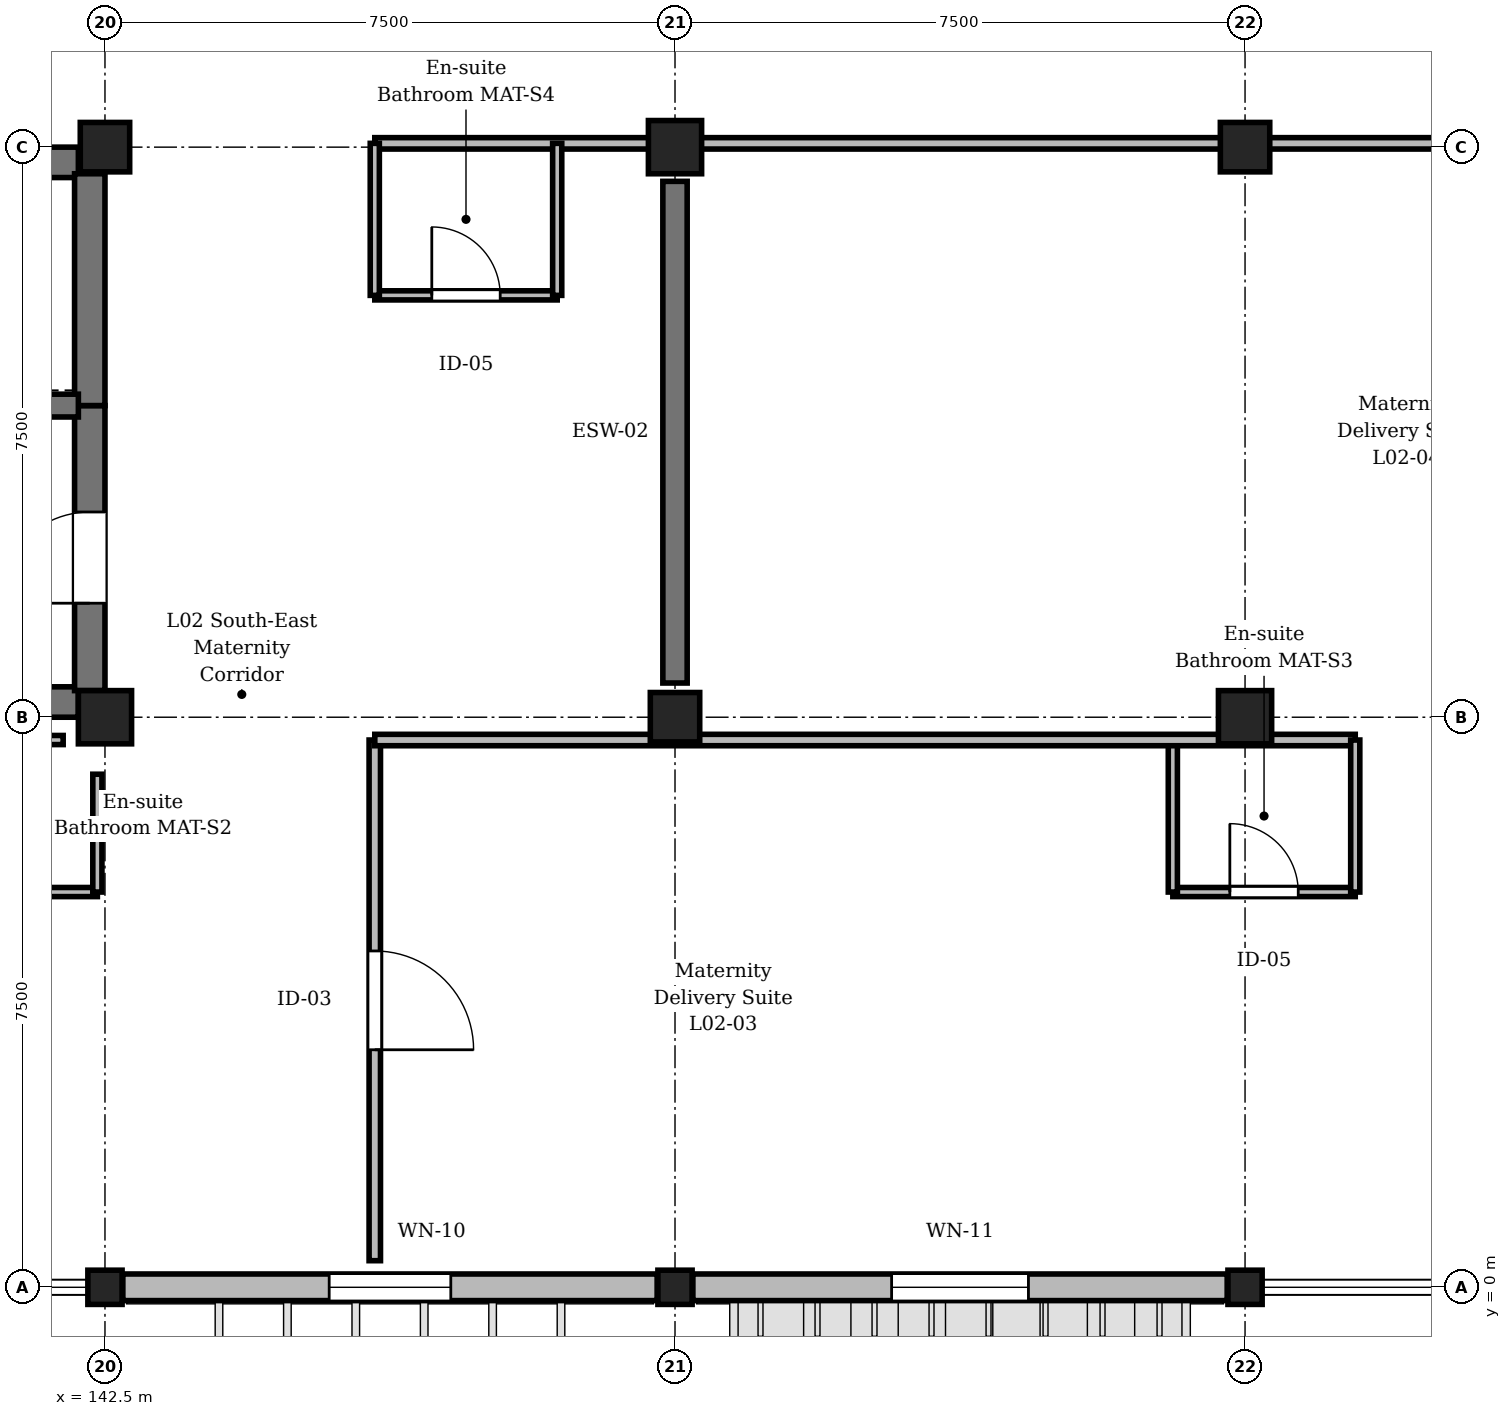
"""IFC4 building model, lengths in metres.
Left out: names, types, materials, properties, quantities, classifications, styles, units other than length and angle.
Written with IfcOpenShell. Run it as: python <this file> out.ifc"""

import sys

from ifc_helpers import new_model, si_unit, direction, frame, frame_2d, origin, origin_2d, place, context, subcontext, project, spatial, rectangle, extrude, element, fill, save


model = new_model("IFC4")
c1 = context("Model", 3, precision=1e-05, world=origin(), true_north=direction((0.0, 1.0)))
c2 = subcontext(c1, "Body", "Model", "MODEL_VIEW")
j1 = project(units=[si_unit("LENGTHUNIT", "METRE"), si_unit("PLANEANGLEUNIT", "RADIAN")], contexts=[c1])
p1 = place(None, origin())
s1 = spatial("IfcSite", under=j1, at=p1, CompositionType="ELEMENT")
p2 = place(p1, origin())
s2 = spatial("IfcBuilding", under=s1, at=p2, CompositionType="ELEMENT")
p3 = place(p2, frame((0.0, 0.0, 9.3)))
s3 = spatial("IfcBuildingStorey", under=s2, at=p3, CompositionType="ELEMENT", Elevation=9.3)
p4 = place(p3, frame((142.5, 0.0, 0.0), z_axis=(0.0, 0.0, 1.0), x_axis=(1.0, 0.0, 0.0)))
e1 = element("IfcColumn", 1, at=p4, inside=s3, PredefinedType="COLUMN", context=c2, shape_type="SweptSolid", body=[
    extrude(rectangle(XDim=0.45, YDim=0.45, at=origin_2d()), origin(), (0.0, 0.0, 1.0), 4.8),
])
p5 = place(p3, frame((142.5, 7.5, 0.0), z_axis=(0.0, 0.0, 1.0), x_axis=(1.0, 0.0, 0.0)))
e2 = element("IfcColumn", 2, at=p5, inside=s3, PredefinedType="COLUMN", context=c2, shape_type="SweptSolid", body=[
    extrude(rectangle(XDim=0.7, YDim=0.7, at=origin_2d()), origin(), (0.0, 0.0, 1.0), 4.8),
])
p6 = place(p3, frame((142.5, 15.0, 0.0), z_axis=(0.0, 0.0, 1.0), x_axis=(1.0, 0.0, 0.0)))
e3 = element("IfcColumn", 3, at=p6, inside=s3, PredefinedType="COLUMN", context=c2, shape_type="SweptSolid", body=[
    extrude(rectangle(XDim=0.65, YDim=0.65, at=origin_2d()), origin(), (0.0, 0.0, 1.0), 4.8),
])
p7 = place(p3, frame((150.0, 0.0, 0.0), z_axis=(0.0, 0.0, 1.0), x_axis=(1.0, 0.0, 0.0)))
e4 = element("IfcColumn", 4, at=p7, inside=s3, PredefinedType="COLUMN", context=c2, shape_type="SweptSolid", body=[
    extrude(rectangle(XDim=0.45, YDim=0.45, at=origin_2d()), origin(), (0.0, 0.0, 1.0), 4.8),
])
p8 = place(p3, frame((150.0, 7.5, 0.0), z_axis=(0.0, 0.0, 1.0), x_axis=(1.0, 0.0, 0.0)))
e5 = element("IfcColumn", 5, at=p8, inside=s3, PredefinedType="COLUMN", context=c2, shape_type="SweptSolid", body=[
    extrude(rectangle(XDim=0.65, YDim=0.65, at=origin_2d()), origin(), (0.0, 0.0, 1.0), 4.8),
])
p9 = place(p3, frame((150.0, 15.0, 0.0), z_axis=(0.0, 0.0, 1.0), x_axis=(1.0, 0.0, 0.0)))
e6 = element("IfcColumn", 6, at=p9, inside=s3, PredefinedType="COLUMN", context=c2, shape_type="SweptSolid", body=[
    extrude(rectangle(XDim=0.7, YDim=0.7, at=origin_2d()), origin(), (0.0, 0.0, 1.0), 4.8),
])
p10 = place(p3, frame((157.5, 0.0, 0.0), z_axis=(0.0, 0.0, 1.0), x_axis=(1.0, 0.0, 0.0)))
e7 = element("IfcColumn", 7, at=p10, inside=s3, PredefinedType="COLUMN", context=c2, shape_type="SweptSolid", body=[
    extrude(rectangle(XDim=0.45, YDim=0.45, at=origin_2d()), origin(), (0.0, 0.0, 1.0), 4.8),
])
p11 = place(p3, frame((157.5, 7.5, 0.0), z_axis=(0.0, 0.0, 1.0), x_axis=(1.0, 0.0, 0.0)))
e8 = element("IfcColumn", 8, at=p11, inside=s3, PredefinedType="COLUMN", context=c2, shape_type="SweptSolid", body=[
    extrude(rectangle(XDim=0.7, YDim=0.7, at=origin_2d()), origin(), (0.0, 0.0, 1.0), 4.8),
])
p12 = place(p3, frame((157.5, 15.0, 0.0), z_axis=(0.0, 0.0, 1.0), x_axis=(1.0, 0.0, 0.0)))
e9 = element("IfcColumn", 9, at=p12, inside=s3, PredefinedType="COLUMN", context=c2, shape_type="SweptSolid", body=[
    extrude(rectangle(XDim=0.65, YDim=0.65, at=origin_2d()), origin(), (0.0, 0.0, 1.0), 4.8),
])
p13 = place(p3, frame((150.0, 7.95, 0.0), z_axis=(0.0, 0.0, 1.0), x_axis=(0.0, 1.0, 0.0)))
e10 = element("IfcWall", 10, at=p13, inside=s3, PredefinedType="SHEAR", context=c2, shape_type="SweptSolid", body=[
    extrude(rectangle(XDim=6.6, YDim=0.32, at=frame_2d((3.3, 0.0))), origin(), (0.0, 0.0, 1.0), 4.0),
])
p14 = place(p3, frame((149.765, 0.0, 0.0), z_axis=(0.0, 0.0, 1.0), x_axis=(-1.0, 0.0, 0.0)))
e11 = element("IfcWall", 11, at=p14, inside=s3, PredefinedType="STANDARD", context=c2, shape_type="SweptSolid", body=[
    extrude(rectangle(XDim=7.03, YDim=0.35, at=frame_2d((3.515, 0.0))), origin(), (0.0, 0.0, 1.0), 3.95),
])
p15 = place(p14, frame((2.715, 0.0, 0.9)))
e12 = element("IfcOpeningElement", 12, at=p15, cuts=e11, PredefinedType="OPENING", context=c2, shape_type="SweptSolid", body=[
    extrude(rectangle(XDim=1.6, YDim=1.95, at=frame_2d((0.8, 0.975))), frame((0.0, 0.185, 0.0), z_axis=(0.0, -1.0, 0.0), x_axis=(1.0, 0.0, 0.0)), (0.0, 0.0, 1.0), 0.37),
])
p16 = place(p3, frame((157.265, 0.0, 0.0), z_axis=(0.0, 0.0, 1.0), x_axis=(-1.0, 0.0, 0.0)))
e13 = element("IfcWall", 13, at=p16, inside=s3, PredefinedType="STANDARD", context=c2, shape_type="SweptSolid", body=[
    extrude(rectangle(XDim=7.03, YDim=0.35, at=frame_2d((3.515, 0.0))), origin(), (0.0, 0.0, 1.0), 3.95),
])
p17 = place(p16, frame((2.615, 0.0, 0.9)))
e14 = element("IfcOpeningElement", 14, at=p17, cuts=e13, PredefinedType="OPENING", context=c2, shape_type="SweptSolid", body=[
    extrude(rectangle(XDim=1.8, YDim=1.95, at=frame_2d((0.9, 0.975))), frame((0.0, 0.185, 0.0), z_axis=(0.0, -1.0, 0.0), x_axis=(1.0, 0.0, 0.0)), (0.0, 0.0, 1.0), 0.37),
])
p18 = place(p3, frame((135.9, 7.7, 0.0), z_axis=(0.0, 0.0, 1.0), x_axis=(1.0, 0.0, 0.0)))
e15 = element("IfcWall", 15, at=p18, inside=s3, PredefinedType="SHEAR", context=c2, shape_type="SweptSolid", body=[
    extrude(rectangle(XDim=6.25, YDim=0.4, at=frame_2d((3.125, 0.0))), origin(), (0.0, 0.0, 1.0), 4.55),
])
p19 = place(p3, frame((127.85, 14.8, 0.0), z_axis=(0.0, 0.0, 1.0), x_axis=(1.0, 0.0, 0.0)))
e16 = element("IfcWall", 16, at=p19, inside=s3, PredefinedType="SHEAR", context=c2, shape_type="SweptSolid", body=[
    extrude(rectangle(XDim=14.3, YDim=0.4, at=frame_2d((7.15, 0.0))), origin(), (0.0, 0.0, 1.0), 4.55),
])
p20 = place(p3, frame((142.3, 7.85, 0.0), z_axis=(0.0, 0.0, 1.0), x_axis=(0.0, 1.0, 0.0)))
e17 = element("IfcWall", 17, at=p20, inside=s3, PredefinedType="SHEAR", context=c2, shape_type="SweptSolid", body=[
    extrude(rectangle(XDim=3.75, YDim=0.4, at=frame_2d((1.875, 0.0))), origin(), (0.0, 0.0, 1.0), 4.55),
])
p21 = place(p20, frame((1.15, 0.0, 0.0)))
e18 = element("IfcOpeningElement", 18, at=p21, cuts=e17, PredefinedType="OPENING", context=c2, shape_type="SweptSolid", body=[
    extrude(rectangle(XDim=1.2, YDim=2.25, at=frame_2d((0.6, 1.125))), frame((0.0, 0.21, 0.0), z_axis=(0.0, -1.0, 0.0), x_axis=(1.0, 0.0, 0.0)), (0.0, 0.0, 1.0), 0.42),
])
p22 = place(p3, frame((142.3, 11.6, 0.0), z_axis=(0.0, 0.0, 1.0), x_axis=(0.0, 1.0, 0.0)))
e19 = element("IfcWall", 19, at=p22, inside=s3, PredefinedType="SHEAR", context=c2, shape_type="SweptSolid", body=[
    extrude(rectangle(XDim=3.05, YDim=0.4, at=frame_2d((1.525, 0.0))), origin(), (0.0, 0.0, 1.0), 4.55),
])
p23 = place(p3, frame((135.9, 11.6, 0.0), z_axis=(0.0, 0.0, 1.0), x_axis=(1.0, 0.0, 0.0)))
e20 = element("IfcWall", 20, at=p23, inside=s3, PredefinedType="SHEAR", context=c2, shape_type="SweptSolid", body=[
    extrude(rectangle(XDim=6.25, YDim=0.3, at=frame_2d((3.125, 0.0))), origin(), (0.0, 0.0, 1.0), 4.55),
])
p24 = place(p23, frame((0.95, 0.0, 0.0)))
e21 = element("IfcOpeningElement", 21, at=p24, cuts=e20, PredefinedType="OPENING", context=c2, shape_type="SweptSolid", body=[
    extrude(rectangle(XDim=1.3, YDim=2.2, at=frame_2d((0.65, 1.1))), frame((0.0, 0.16, 0.0), z_axis=(0.0, -1.0, 0.0), x_axis=(1.0, 0.0, 0.0)), (0.0, 0.0, 1.0), 0.32),
])
p25 = place(p23, frame((4.15, 0.0, 0.0)))
e22 = element("IfcOpeningElement", 22, at=p25, cuts=e20, PredefinedType="OPENING", context=c2, shape_type="SweptSolid", body=[
    extrude(rectangle(XDim=1.3, YDim=2.2, at=frame_2d((0.65, 1.1))), frame((0.0, 0.16, 0.0), z_axis=(0.0, -1.0, 0.0), x_axis=(1.0, 0.0, 0.0)), (0.0, 0.0, 1.0), 0.32),
])
p26 = place(p3, frame((140.0, 5.2, 0.0), z_axis=(0.0, 0.0, 1.0), x_axis=(1.0, 0.0, 0.0)))
e23 = element("IfcWall", 23, at=p26, inside=s3, PredefinedType="PARTITIONING", context=c2, shape_type="SweptSolid", body=[
    extrude(rectangle(XDim=2.4, YDim=0.12, at=frame_2d((1.2, 0.0))), origin(), (0.0, 0.0, 1.0), 4.535),
])
p27 = place(p26, frame((0.75, 0.0, 0.0)))
e24 = element("IfcOpeningElement", 24, at=p27, cuts=e23, PredefinedType="OPENING", context=c2, shape_type="SweptSolid", body=[
    extrude(rectangle(XDim=0.9, YDim=2.1, at=frame_2d((0.45, 1.05))), frame((0.0, 0.07, 0.0), z_axis=(0.0, -1.0, 0.0), x_axis=(1.0, 0.0, 0.0)), (0.0, 0.0, 1.0), 0.14),
])
p28 = place(p3, frame((146.05, 7.2, 0.0), z_axis=(0.0, 0.0, 1.0), x_axis=(0.0, -1.0, 0.0)))
e25 = element("IfcWall", 25, at=p28, inside=s3, PredefinedType="PARTITIONING", context=c2, shape_type="SweptSolid", body=[
    extrude(rectangle(XDim=6.85, YDim=0.15, at=frame_2d((3.425, 0.0))), origin(), (0.0, 0.0, 1.0), 4.535),
])
p29 = place(p28, frame((2.775, 0.0, 0.0)))
e26 = element("IfcOpeningElement", 26, at=p29, cuts=e25, PredefinedType="OPENING", context=c2, shape_type="SweptSolid", body=[
    extrude(rectangle(XDim=1.3, YDim=2.2, at=frame_2d((0.65, 1.1))), frame((0.0, 0.085, 0.0), z_axis=(0.0, -1.0, 0.0), x_axis=(1.0, 0.0, 0.0)), (0.0, 0.0, 1.0), 0.17),
])
p30 = place(p3, frame((156.55, 5.2, 0.0), z_axis=(0.0, 0.0, 1.0), x_axis=(1.0, 0.0, 0.0)))
e27 = element("IfcWall", 27, at=p30, inside=s3, PredefinedType="PARTITIONING", context=c2, shape_type="SweptSolid", body=[
    extrude(rectangle(XDim=2.4, YDim=0.12, at=frame_2d((1.2, 0.0))), origin(), (0.0, 0.0, 1.0), 4.535),
])
p31 = place(p30, frame((0.75, 0.0, 0.0)))
e28 = element("IfcOpeningElement", 28, at=p31, cuts=e27, PredefinedType="OPENING", context=c2, shape_type="SweptSolid", body=[
    extrude(rectangle(XDim=0.9, YDim=2.1, at=frame_2d((0.45, 1.05))), frame((0.0, 0.07, 0.0), z_axis=(0.0, -1.0, 0.0), x_axis=(1.0, 0.0, 0.0)), (0.0, 0.0, 1.0), 0.14),
])
p32 = place(p3, frame((156.55, 5.2, 0.0), z_axis=(0.0, 0.0, 1.0), x_axis=(0.0, 1.0, 0.0)))
e29 = element("IfcWall", 29, at=p32, inside=s3, PredefinedType="PARTITIONING", context=c2, shape_type="SweptSolid", body=[
    extrude(rectangle(XDim=2.0, YDim=0.12, at=frame_2d((1.0, 0.0))), origin(), (0.0, 0.0, 1.0), 4.535),
])
p33 = place(p3, frame((172.15, 15.05, 0.0), z_axis=(0.0, 0.0, 1.0), x_axis=(-1.0, 0.0, 0.0)))
e30 = element("IfcWall", 30, at=p33, inside=s3, PredefinedType="PARTITIONING", context=c2, shape_type="SweptSolid", body=[
    extrude(rectangle(XDim=26.1, YDim=0.15, at=frame_2d((13.05, 0.0))), origin(), (0.0, 0.0, 1.0), 3.985),
])
p34 = place(p33, frame((2.68, 0.0, 0.0)))
e31 = element("IfcOpeningElement", 31, at=p34, cuts=e30, PredefinedType="OPENING", context=c2, shape_type="SweptSolid", body=[
    extrude(rectangle(XDim=1.3, YDim=2.2, at=frame_2d((0.65, 1.1))), frame((0.0, 0.085, 0.0), z_axis=(0.0, -1.0, 0.0), x_axis=(1.0, 0.0, 0.0)), (0.0, 0.0, 1.0), 0.17),
])
p35 = place(p3, frame((146.05, 13.05, 0.0), z_axis=(0.0, 0.0, 1.0), x_axis=(1.0, 0.0, 0.0)))
e32 = element("IfcWall", 32, at=p35, inside=s3, PredefinedType="PARTITIONING", context=c2, shape_type="SweptSolid", body=[
    extrude(rectangle(XDim=2.4, YDim=0.12, at=frame_2d((1.2, 0.0))), origin(), (0.0, 0.0, 1.0), 4.535),
])
p36 = place(p35, frame((0.75, 0.0, 0.0)))
e33 = element("IfcOpeningElement", 33, at=p36, cuts=e32, PredefinedType="OPENING", context=c2, shape_type="SweptSolid", body=[
    extrude(rectangle(XDim=0.9, YDim=2.1, at=frame_2d((0.45, 1.05))), frame((0.0, 0.07, 0.0), z_axis=(0.0, -1.0, 0.0), x_axis=(1.0, 0.0, 0.0)), (0.0, 0.0, 1.0), 0.14),
])
p37 = place(p3, frame((148.45, 13.05, 0.0), z_axis=(0.0, 0.0, 1.0), x_axis=(0.0, 1.0, 0.0)))
e34 = element("IfcWall", 34, at=p37, inside=s3, PredefinedType="PARTITIONING", context=c2, shape_type="SweptSolid", body=[
    extrude(rectangle(XDim=2.0, YDim=0.12, at=frame_2d((1.0, 0.0))), origin(), (0.0, 0.0, 1.0), 4.535),
])
p38 = place(p3, frame((146.05, 7.2, 0.0), z_axis=(0.0, 0.0, 1.0), x_axis=(1.0, 0.0, 0.0)))
e35 = element("IfcWall", 35, at=p38, inside=s3, PredefinedType="PARTITIONING", context=c2, shape_type="SweptSolid", body=[
    extrude(rectangle(XDim=12.9, YDim=0.15, at=frame_2d((6.45, 0.0))), origin(), (0.0, 0.0, 1.0), 3.985),
])
p39 = place(p3, frame((140.0, 7.2, 0.0), z_axis=(0.0, 0.0, 1.0), x_axis=(1.0, 0.0, 0.0)))
e36 = element("IfcWall", 36, at=p39, inside=s3, PredefinedType="PARTITIONING", context=c2, shape_type="SweptSolid", body=[
    extrude(rectangle(XDim=1.95, YDim=0.12, at=frame_2d((0.975, 0.0))), origin(), (0.0, 0.0, 1.0), 3.985),
])
p40 = place(p3, frame((142.4, 5.2, 0.0), z_axis=(0.0, 0.0, 1.0), x_axis=(0.0, 1.0, 0.0)))
e37 = element("IfcWall", 37, at=p40, inside=s3, PredefinedType="PARTITIONING", context=c2, shape_type="SweptSolid", body=[
    extrude(rectangle(XDim=1.55, YDim=0.12, at=frame_2d((0.775, 0.0))), origin(), (0.0, 0.0, 1.0), 4.035),
])
for number, where, z_axis, x_axis in (
    (38, (158.95, 5.2, 0.0), (0.0, 0.0, 1.0), (0.0, 1.0, 0.0)),
    (39, (146.05, 13.05, 0.0), (0.0, 0.0, 1.0), (0.0, 1.0, 0.0)),
):
    element("IfcWall", number, at=place(p3, frame(where, z_axis=z_axis, x_axis=x_axis)), inside=s3, PredefinedType="PARTITIONING", context=c2, shape_type="SweptSolid", body=[
        extrude(rectangle(XDim=2.0, YDim=0.12, at=frame_2d((1.0, 0.0))), origin(), (0.0, 0.0, 1.0), 4.535),
    ])
p41 = place(p15, origin())
e40 = element("IfcWindow", 40, at=p41, inside=s3, PartitioningType="SINGLE_PANEL", PredefinedType="WINDOW", context=c2, shape_type="SweptSolid", body=[
    extrude(rectangle(XDim=1.6, YDim=1.95, at=frame_2d((0.8, 0.975))), frame((0.0, 0.03, 0.0), z_axis=(0.0, -1.0, 0.0), x_axis=(1.0, 0.0, 0.0)), (0.0, 0.0, 1.0), 0.06),
])
fill(e12, e40)
p42 = place(p17, origin())
e41 = element("IfcWindow", 41, at=p42, inside=s3, PartitioningType="SINGLE_PANEL", PredefinedType="WINDOW", context=c2, shape_type="SweptSolid", body=[
    extrude(rectangle(XDim=1.8, YDim=1.95, at=frame_2d((0.9, 0.975))), frame((0.0, 0.03, 0.0), z_axis=(0.0, -1.0, 0.0), x_axis=(1.0, 0.0, 0.0)), (0.0, 0.0, 1.0), 0.06),
])
fill(e14, e41)
p43 = place(p21, origin())
e42 = element("IfcDoor", 42, at=p43, inside=s3, OperationType="SINGLE_SWING_LEFT", PredefinedType="DOOR", context=c2, shape_type="SweptSolid", body=[
    extrude(rectangle(XDim=1.2, YDim=2.25, at=frame_2d((0.6, 1.125))), frame((0.0, 0.025, 0.0), z_axis=(0.0, -1.0, 0.0), x_axis=(1.0, 0.0, 0.0)), (0.0, 0.0, 1.0), 0.05),
])
fill(e18, e42)
p44 = place(p29, origin())
e43 = element("IfcDoor", 43, at=p44, inside=s3, OperationType="SINGLE_SWING_RIGHT", PredefinedType="DOOR", context=c2, shape_type="SweptSolid", body=[
    extrude(rectangle(XDim=1.3, YDim=2.2, at=frame_2d((0.65, 1.1))), frame((0.0, 0.025, 0.0), z_axis=(0.0, -1.0, 0.0), x_axis=(1.0, 0.0, 0.0)), (0.0, 0.0, 1.0), 0.05),
])
fill(e26, e43)
p45 = place(p31, origin())
e44 = element("IfcDoor", 44, at=p45, inside=s3, OperationType="SINGLE_SWING_LEFT", PredefinedType="DOOR", context=c2, shape_type="SweptSolid", body=[
    extrude(rectangle(XDim=0.9, YDim=2.1, at=frame_2d((0.45, 1.05))), frame((0.0, 0.025, 0.0), z_axis=(0.0, -1.0, 0.0), x_axis=(1.0, 0.0, 0.0)), (0.0, 0.0, 1.0), 0.05),
])
fill(e28, e44)
p46 = place(p36, origin())
e45 = element("IfcDoor", 45, at=p46, inside=s3, OperationType="SINGLE_SWING_LEFT", PredefinedType="DOOR", context=c2, shape_type="SweptSolid", body=[
    extrude(rectangle(XDim=0.9, YDim=2.1, at=frame_2d((0.45, 1.05))), frame((0.0, 0.025, 0.0), z_axis=(0.0, -1.0, 0.0), x_axis=(1.0, 0.0, 0.0)), (0.0, 0.0, 1.0), 0.05),
])
fill(e33, e45)
save(model, sys.argv[1])
